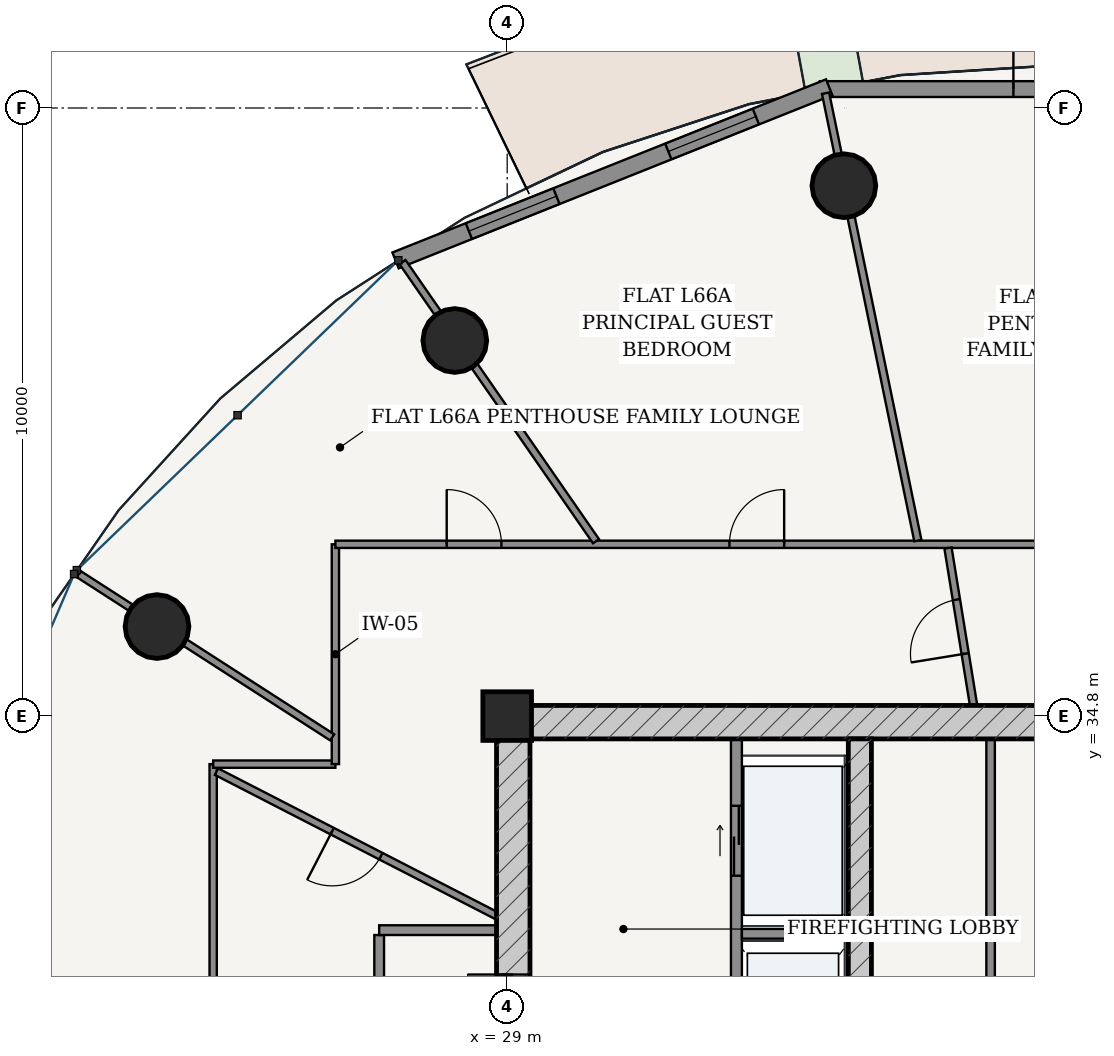
"""IFC4 building model, lengths in metres.
Left out: names, types, materials, properties, quantities, classifications, styles, units other than length and angle.
Written with IfcOpenShell. Run it as: python <this file> out.ifc"""

import sys

from ifc_helpers import new_model, si_unit, direction, frame, frame_2d, origin, origin_2d, place, context, subcontext, project, spatial, rectangle, hollow_circle, extrude, source, transform, mapped, element, fill, save


model = new_model("IFC4")
c1 = context("Model", 3, precision=1e-05, world=origin(), true_north=direction((-0.2419218956, 0.970295726276)))
c2 = subcontext(c1, "Body", "Model", "MODEL_VIEW")
j1 = project(units=[si_unit("LENGTHUNIT", "METRE"), si_unit("PLANEANGLEUNIT", "RADIAN")], contexts=[c1])
p1 = place(None, origin())
s1 = spatial("IfcSite", under=j1, at=p1, CompositionType="ELEMENT")
p2 = place(p1, origin())
s2 = spatial("IfcBuilding", under=s1, at=p2, CompositionType="ELEMENT")
p3 = place(p2, frame((0.0, 0.0, 251.95)))
s3 = spatial("IfcBuildingStorey", under=s2, at=p3, CompositionType="ELEMENT", Elevation=251.95)
p4 = place(p3, frame((29.0, 34.8, 0.0), z_axis=(0.0, 0.0, 1.0), x_axis=(1.0, 0.0, 0.0)))
e1 = element("IfcColumn", 1, at=p4, inside=s3, PredefinedType="COLUMN", context=c2, shape_type="SweptSolid", body=[
    extrude(rectangle(XDim=0.8, YDim=0.8, at=origin_2d()), origin(), (0.0, 0.0, 1.0), 3.75),
])
p5 = place(p3, frame((28.825, 34.7, 0.0), z_axis=(0.0, 0.0, 1.0), x_axis=(1.0, 0.0, 0.0)))
e2 = element("IfcWall", 2, at=p5, inside=s3, PredefinedType="SHEAR", context=c2, shape_type="SweptSolid", body=[
    extrude(rectangle(XDim=18.35, YDim=0.55, at=frame_2d((9.175, 0.0))), origin(), (0.0, 0.0, 1.0), 3.49),
])
p6 = place(p3, frame((29.1, 19.175, 0.0), z_axis=(0.0, 0.0, 1.0), x_axis=(0.0, 1.0, 0.0)))
e3 = element("IfcWall", 3, at=p6, inside=s3, PredefinedType="SHEAR", context=c2, shape_type="SweptSolid", body=[
    extrude(rectangle(XDim=15.25, YDim=0.55, at=frame_2d((7.625, 0.0))), origin(), (0.0, 0.0, 1.0), 3.49),
])
p7 = place(p6, frame((9.875, 0.0, 0.0)))
e4 = element("IfcOpeningElement", 4, at=p7, cuts=e3, PredefinedType="OPENING", context=c2, shape_type="SweptSolid", body=[
    extrude(rectangle(XDim=1.5, YDim=2.2, at=frame_2d((0.75, 1.1))), frame((0.0, 0.285, 0.0), z_axis=(0.0, -1.0, 0.0), x_axis=(1.0, 0.0, 0.0)), (0.0, 0.0, 1.0), 0.57),
])
p8 = place(p3, frame((34.8, 19.175, 0.0), z_axis=(0.0, 0.0, 1.0), x_axis=(0.0, 1.0, 0.0)))
e5 = element("IfcWall", 5, at=p8, inside=s3, PredefinedType="SHEAR", context=c2, shape_type="SweptSolid", body=[
    extrude(rectangle(XDim=15.25, YDim=0.38, at=frame_2d((7.625, 0.0))), origin(), (0.0, 0.0, 1.0), 3.49),
])
p9 = place(p8, frame((7.8, 0.0, 0.0)))
e6 = element("IfcOpeningElement", 6, at=p9, cuts=e5, PredefinedType="OPENING", context=c2, shape_type="SweptSolid", body=[
    extrude(rectangle(XDim=1.05, YDim=2.15, at=frame_2d((0.525, 1.075))), frame((0.0, 0.2, 0.0), z_axis=(0.0, -1.0, 0.0), x_axis=(1.0, 0.0, 0.0)), (0.0, 0.0, 1.0), 0.4),
])
for number, where, z_axis, x_axis in (
    (7, (34.537, 43.522, 0.0), (0.0, 0.0, 1.0), (1.0, 0.0, 0.0)),
    (8, (28.139, 40.977, 0.0), (0.0, 0.0, 1.0), (1.0, 0.0, 0.0)),
    (9, (23.241, 36.272, 0.0), (0.0, 0.0, 1.0), (1.0, 0.0, 0.0)),
):
    element("IfcColumn", number, at=place(p3, frame(where, z_axis=z_axis, x_axis=x_axis)), inside=s3, PredefinedType="COLUMN", context=c2, shape_type="SweptSolid", body=[
        extrude(hollow_circle(Radius=0.525, WallThickness=0.035, at=origin_2d()), origin(), (0.0, 0.0, 1.0), 3.75),
    ])
p10 = place(p3, frame((41.859, 45.111, 0.0), z_axis=(0.0, 0.0, 1.0), x_axis=(-1.0, 0.0, 0.0)))
e10 = element("IfcWall", 10, at=p10, inside=s3, PredefinedType="SOLIDWALL", context=c2, shape_type="SweptSolid", body=[
    extrude(rectangle(XDim=7.718, YDim=0.26, at=frame_2d((3.859, 0.0))), origin(), (0.0, 0.0, 1.0), 3.49),
])
p11 = place(p10, frame((3.184, 0.0, 0.0)))
e11 = element("IfcOpeningElement", 11, at=p11, cuts=e10, PredefinedType="OPENING", context=c2, shape_type="SweptSolid", body=[
    extrude(rectangle(XDim=1.35, YDim=2.2, at=frame_2d((0.675, 1.1))), frame((0.0, 0.14, 0.0), z_axis=(0.0, -1.0, 0.0), x_axis=(1.0, 0.0, 0.0)), (0.0, 0.0, 1.0), 0.28),
])
p12 = place(p3, frame((34.295, 45.141, 0.0), z_axis=(0.0, 0.0, 1.0), x_axis=(-0.928724272392, -0.370771123296, 0.0)))
e12 = element("IfcWall", 12, at=p12, inside=s3, PredefinedType="SOLIDWALL", context=c2, shape_type="SweptSolid", body=[
    extrude(rectangle(XDim=7.678, YDim=0.28, at=frame_2d((3.839, 0.0))), origin(), (0.0, 0.0, 1.0), 3.49),
])
p13 = place(p12, frame((1.298, 0.0, 0.85)))
e13 = element("IfcOpeningElement", 13, at=p13, cuts=e12, PredefinedType="OPENING", context=c2, shape_type="SweptSolid", body=[
    extrude(rectangle(XDim=1.55, YDim=1.95, at=frame_2d((0.775, 0.975))), frame((0.0, 0.15, 0.0), z_axis=(0.0, -1.0, 0.0), x_axis=(1.0, 0.0, 0.0)), (0.0, 0.0, 1.0), 0.3),
])
p14 = place(p12, frame((4.83, 0.0, 0.85)))
e14 = element("IfcOpeningElement", 14, at=p14, cuts=e12, PredefinedType="OPENING", context=c2, shape_type="SweptSolid", body=[
    extrude(rectangle(XDim=1.55, YDim=1.95, at=frame_2d((0.775, 0.975))), frame((0.0, 0.15, 0.0), z_axis=(0.0, -1.0, 0.0), x_axis=(1.0, 0.0, 0.0)), (0.0, 0.0, 1.0), 0.3),
])
p15 = place(p3, frame((32.77, 28.52, 0.0), z_axis=(0.0, 0.0, 1.0), x_axis=(0.0, 1.0, 0.0)))
e15 = element("IfcWall", 15, at=p15, inside=s3, PredefinedType="PARTITIONING", context=c2, shape_type="SweptSolid", body=[
    extrude(rectangle(XDim=5.905, YDim=0.18, at=frame_2d((2.953, 0.0))), origin(), (0.0, 0.0, 1.0), 3.49),
])
p16 = place(p15, frame((3.655, 0.0, 0.0)))
e16 = element("IfcOpeningElement", 16, at=p16, cuts=e15, PredefinedType="OPENING", context=c2, shape_type="SweptSolid", body=[
    extrude(rectangle(XDim=1.15, YDim=2.2, at=frame_2d((0.575, 1.1))), frame((0.0, 0.1, 0.0), z_axis=(0.0, -1.0, 0.0), x_axis=(1.0, 0.0, 0.0)), (0.0, 0.0, 1.0), 0.2),
])
p17 = place(p15, frame((0.73, 0.0, 0.0)))
e17 = element("IfcOpeningElement", 17, at=p17, cuts=e15, PredefinedType="OPENING", context=c2, shape_type="SweptSolid", body=[
    extrude(rectangle(XDim=1.2, YDim=2.25, at=frame_2d((0.6, 1.125))), frame((0.0, 0.1, 0.0), z_axis=(0.0, -1.0, 0.0), x_axis=(1.0, 0.0, 0.0)), (0.0, 0.0, 1.0), 0.2),
])
p18 = place(p3, frame((32.86, 31.22, 0.0), z_axis=(0.0, 0.0, 1.0), x_axis=(1.0, 0.0, 0.0)))
e18 = element("IfcWall", 18, at=p18, inside=s3, PredefinedType="PARTITIONING", context=c2, shape_type="SweptSolid", body=[
    extrude(rectangle(XDim=1.75, YDim=0.16, at=frame_2d((0.875, 0.0))), origin(), (0.0, 0.0, 1.0), 3.49),
])
p19 = place(p3, frame((36.95, 28.56, 0.0), z_axis=(0.0, 0.0, 1.0), x_axis=(0.0, 1.0, 0.0)))
e19 = element("IfcWall", 19, at=p19, inside=s3, PredefinedType="PARTITIONING", context=c2, shape_type="SweptSolid", body=[
    extrude(rectangle(XDim=5.865, YDim=0.14, at=frame_2d((2.933, 0.0))), origin(), (0.0, 0.0, 1.0), 3.49),
])
p20 = place(p3, frame((26.895, 17.275, 0.0), z_axis=(0.0, 0.0, 1.0), x_axis=(0.0, 1.0, 0.0)))
e20 = element("IfcWall", 20, at=p20, inside=s3, PredefinedType="PARTITIONING", context=c2, shape_type="SweptSolid", body=[
    extrude(rectangle(XDim=13.925, YDim=0.16, at=frame_2d((6.962, 0.0))), origin(), (0.0, 0.0, 1.0), 3.015),
])
p21 = place(p3, frame((26.895, 31.28, 0.0), z_axis=(0.0, 0.0, 1.0), x_axis=(1.0, 0.0, 0.0)))
e21 = element("IfcWall", 21, at=p21, inside=s3, PredefinedType="PARTITIONING", context=c2, shape_type="SweptSolid", body=[
    extrude(rectangle(XDim=1.93, YDim=0.16, at=frame_2d((0.965, 0.0))), origin(), (0.0, 0.0, 1.0), 3.49),
])
p22 = place(p3, frame((24.165, 24.249, 0.0), z_axis=(0.0, 0.0, 1.0), x_axis=(0.0, 1.0, 0.0)))
e22 = element("IfcWall", 22, at=p22, inside=s3, PredefinedType="PARTITIONING", context=c2, shape_type="SweptSolid", body=[
    extrude(rectangle(XDim=9.761, YDim=0.12, at=frame_2d((4.88, 0.0))), origin(), (0.0, 0.0, 1.0), 3.015),
])
p23 = place(p22, frame((4.43, 0.0, 0.0)))
e23 = element("IfcOpeningElement", 23, at=p23, cuts=e22, PredefinedType="OPENING", context=c2, shape_type="SweptSolid", body=[
    extrude(rectangle(XDim=0.9, YDim=2.15, at=frame_2d((0.45, 1.075))), frame((0.0, 0.07, 0.0), z_axis=(0.0, -1.0, 0.0), x_axis=(1.0, 0.0, 0.0)), (0.0, 0.0, 1.0), 0.14),
])
p24 = place(p3, frame((24.165, 34.01, 0.0), z_axis=(0.0, 0.0, 1.0), x_axis=(1.0, 0.0, 0.0)))
e24 = element("IfcWall", 24, at=p24, inside=s3, PredefinedType="PARTITIONING", context=c2, shape_type="SweptSolid", body=[
    extrude(rectangle(XDim=2.01, YDim=0.12, at=frame_2d((1.005, 0.0))), origin(), (0.0, 0.0, 1.0), 3.209),
])
p25 = place(p3, frame((26.175, 34.01, 0.0), z_axis=(0.0, 0.0, 1.0), x_axis=(0.0, 1.0, 0.0)))
e25 = element("IfcWall", 25, at=p25, inside=s3, PredefinedType="PARTITIONING", context=c2, shape_type="SweptSolid", body=[
    extrude(rectangle(XDim=3.615, YDim=0.12, at=frame_2d((1.808, 0.0))), origin(), (0.0, 0.0, 1.0), 3.015),
])
p26 = place(p3, frame((26.175, 37.625, 0.0), z_axis=(0.0, 0.0, 1.0), x_axis=(1.0, 0.0, 0.0)))
e26 = element("IfcWall", 26, at=p26, inside=s3, PredefinedType="PARTITIONING", context=c2, shape_type="SweptSolid", body=[
    extrude(rectangle(XDim=23.65, YDim=0.12, at=frame_2d((11.825, 0.0))), origin(), (0.0, 0.0, 1.0), 3.015),
])
p27 = place(p26, frame((12.791, 0.0, 0.0)))
e27 = element("IfcOpeningElement", 27, at=p27, cuts=e26, PredefinedType="OPENING", context=c2, shape_type="SweptSolid", body=[
    extrude(rectangle(XDim=0.9, YDim=2.15, at=frame_2d((0.45, 1.075))), frame((0.0, 0.07, 0.0), z_axis=(0.0, -1.0, 0.0), x_axis=(1.0, 0.0, 0.0)), (0.0, 0.0, 1.0), 0.14),
])
p28 = place(p26, frame((6.48, 0.0, 0.0)))
e28 = element("IfcOpeningElement", 28, at=p28, cuts=e26, PredefinedType="OPENING", context=c2, shape_type="SweptSolid", body=[
    extrude(rectangle(XDim=0.9, YDim=2.15, at=frame_2d((0.45, 1.075))), frame((0.0, 0.07, 0.0), z_axis=(0.0, -1.0, 0.0), x_axis=(1.0, 0.0, 0.0)), (0.0, 0.0, 1.0), 0.14),
])
p29 = place(p26, frame((1.831, 0.0, 0.0)))
e29 = element("IfcOpeningElement", 29, at=p29, cuts=e26, PredefinedType="OPENING", context=c2, shape_type="SweptSolid", body=[
    extrude(rectangle(XDim=0.9, YDim=2.15, at=frame_2d((0.45, 1.075))), frame((0.0, 0.07, 0.0), z_axis=(0.0, -1.0, 0.0), x_axis=(1.0, 0.0, 0.0)), (0.0, 0.0, 1.0), 0.14),
])
p30 = place(p3, frame((35.754, 37.686, 0.0), z_axis=(0.0, 0.0, 1.0), x_axis=(-0.202105877204, 0.979363678313, 0.0)))
e30 = element("IfcWall", 30, at=p30, inside=s3, PredefinedType="PARTITIONING", context=c2, shape_type="SweptSolid", body=[
    extrude(rectangle(XDim=7.512, YDim=0.12, at=frame_2d((3.756, 0.0))), origin(), (0.0, 0.0, 1.0), 3.015),
])
p31 = place(p3, frame((30.461, 37.676, 0.0), z_axis=(0.0, 0.0, 1.0), x_axis=(-0.569689482466, 0.821860020665, 0.0)))
e31 = element("IfcWall", 31, at=p31, inside=s3, PredefinedType="PARTITIONING", context=c2, shape_type="SweptSolid", body=[
    extrude(rectangle(XDim=5.585, YDim=0.12, at=frame_2d((2.792, 0.0))), origin(), (0.0, 0.0, 1.0), 3.015),
])
p32 = place(p3, frame((26.123, 34.45, 0.0), z_axis=(0.0, 0.0, 1.0), x_axis=(-0.840703033126, 0.541496454367, 0.0)))
e32 = element("IfcWall", 32, at=p32, inside=s3, PredefinedType="PARTITIONING", context=c2, shape_type="SweptSolid", body=[
    extrude(rectangle(XDim=4.958, YDim=0.12, at=frame_2d((2.479, 0.0))), origin(), (0.0, 0.0, 1.0), 3.015),
])
p33 = place(p3, frame((36.67, 34.977, 0.0), z_axis=(0.0, 0.0, 1.0), x_axis=(-0.160605953374, 0.98701860557, 0.0)))
e33 = element("IfcWall", 33, at=p33, inside=s3, PredefinedType="PARTITIONING", context=c2, shape_type="SweptSolid", body=[
    extrude(rectangle(XDim=2.621, YDim=0.12, at=frame_2d((1.31, 0.0))), origin(), (0.0, 0.0, 1.0), 2.575),
])
p34 = place(p33, frame((0.86, 0.0, 0.0)))
e34 = element("IfcOpeningElement", 34, at=p34, cuts=e33, PredefinedType="OPENING", context=c2, shape_type="SweptSolid", body=[
    extrude(rectangle(XDim=0.9, YDim=2.15, at=frame_2d((0.45, 1.075))), frame((0.0, 0.07, 0.0), z_axis=(0.0, -1.0, 0.0), x_axis=(1.0, 0.0, 0.0)), (0.0, 0.0, 1.0), 0.14),
])
p35 = place(p3, frame((28.825, 31.518, 0.0), z_axis=(0.0, 0.0, 1.0), x_axis=(-0.889305882583, 0.457312854842, 0.0)))
e35 = element("IfcWall", 35, at=p35, inside=s3, PredefinedType="PARTITIONING", context=c2, shape_type="SweptSolid", body=[
    extrude(rectangle(XDim=5.178, YDim=0.12, at=frame_2d((2.589, 0.0))), origin(), (0.0, 0.0, 1.0), 3.209),
])
p36 = place(p35, frame((2.139, 0.0, 0.0)))
e36 = element("IfcOpeningElement", 36, at=p36, cuts=e35, PredefinedType="OPENING", context=c2, shape_type="SweptSolid", body=[
    extrude(rectangle(XDim=0.9, YDim=2.15, at=frame_2d((0.45, 1.075))), frame((0.0, 0.07, 0.0), z_axis=(0.0, -1.0, 0.0), x_axis=(1.0, 0.0, 0.0)), (0.0, 0.0, 1.0), 0.14),
])
m1 = source(origin(), c2, "Body", "SweptSolid", [
    extrude(rectangle(XDim=1.35, YDim=2.2, at=frame_2d((0.675, 1.1))), frame((0.0, 0.025, 0.0), z_axis=(0.0, -1.0, 0.0), x_axis=(1.0, 0.0, 0.0)), (0.0, 0.0, 1.0), 0.05),
])
p37 = place(p11, frame((1.35, 0.0, 0.0), z_axis=(0.0, 0.0, 1.0), x_axis=(-1.0, 0.0, 0.0)))
e37 = element("IfcDoor", 37, at=p37, inside=s3, OperationType="SINGLE_SWING_LEFT", PredefinedType="DOOR", context=c2, shape_type="MappedRepresentation", body=[
    mapped(m1, transform((0.0, 0.0, 0.0), scale=1.0)),
])
fill(e11, e37)
m2 = source(origin(), c2, "Body", "SweptSolid", [
    extrude(rectangle(XDim=1.55, YDim=1.95, at=frame_2d((0.775, 0.975))), frame((0.0, 0.03, 0.0), z_axis=(0.0, -1.0, 0.0), x_axis=(1.0, 0.0, 0.0)), (0.0, 0.0, 1.0), 0.06),
])
p38 = place(p13, origin())
e38 = element("IfcWindow", 38, at=p38, inside=s3, PartitioningType="SINGLE_PANEL", PredefinedType="WINDOW", context=c2, shape_type="MappedRepresentation", body=[
    mapped(m2, transform((0.0, 0.0, 0.0), scale=1.0)),
])
fill(e13, e38)
p39 = place(p14, origin())
e39 = element("IfcWindow", 39, at=p39, inside=s3, PartitioningType="SINGLE_PANEL", PredefinedType="WINDOW", context=c2, shape_type="MappedRepresentation", body=[
    mapped(m2, transform((0.0, 0.0, 0.0), scale=1.0)),
])
fill(e14, e39)
m3 = source(origin(), c2, "Body", "SweptSolid", [
    extrude(rectangle(XDim=1.5, YDim=2.2, at=frame_2d((0.75, 1.1))), frame((0.0, 0.025, 0.0), z_axis=(0.0, -1.0, 0.0), x_axis=(1.0, 0.0, 0.0)), (0.0, 0.0, 1.0), 0.05),
])
p40 = place(p7, origin())
e40 = element("IfcDoor", 40, at=p40, inside=s3, OperationType="DOUBLE_DOOR_SINGLE_SWING", PredefinedType="DOOR", context=c2, shape_type="MappedRepresentation", body=[
    mapped(m3, transform((0.0, 0.0, 0.0), scale=1.0)),
])
fill(e4, e40)
m4 = source(origin(), c2, "Body", "SweptSolid", [
    extrude(rectangle(XDim=1.15, YDim=2.2, at=frame_2d((0.575, 1.1))), frame((0.0, 0.025, 0.0), z_axis=(0.0, -1.0, 0.0), x_axis=(1.0, 0.0, 0.0)), (0.0, 0.0, 1.0), 0.05),
])
p41 = place(p16, origin())
e41 = element("IfcDoor", 41, at=p41, inside=s3, OperationType="DOUBLE_DOOR_SLIDING", PredefinedType="DOOR", context=c2, shape_type="MappedRepresentation", body=[
    mapped(m4, transform((0.0, 0.0, 0.0), scale=1.0)),
])
fill(e16, e41)
m5 = source(origin(), c2, "Body", "SweptSolid", [
    extrude(rectangle(XDim=0.9, YDim=2.15, at=frame_2d((0.45, 1.075))), frame((0.0, 0.025, 0.0), z_axis=(0.0, -1.0, 0.0), x_axis=(1.0, 0.0, 0.0)), (0.0, 0.0, 1.0), 0.05),
])
p42 = place(p34, origin())
e42 = element("IfcDoor", 42, at=p42, inside=s3, OperationType="SINGLE_SWING_LEFT", PredefinedType="DOOR", context=c2, shape_type="MappedRepresentation", body=[
    mapped(m5, transform((0.0, 0.0, 0.0), scale=1.0)),
])
fill(e34, e42)
p43 = place(p36, origin())
e43 = element("IfcDoor", 43, at=p43, inside=s3, OperationType="SINGLE_SWING_RIGHT", PredefinedType="DOOR", context=c2, shape_type="MappedRepresentation", body=[
    mapped(m5, transform((0.0, 0.0, 0.0), scale=1.0)),
])
fill(e36, e43)
p44 = place(p28, origin())
e44 = element("IfcDoor", 44, at=p44, inside=s3, OperationType="SINGLE_SWING_RIGHT", PredefinedType="DOOR", context=c2, shape_type="MappedRepresentation", body=[
    mapped(m5, transform((0.0, 0.0, 0.0), scale=1.0)),
])
fill(e28, e44)
p45 = place(p29, origin())
e45 = element("IfcDoor", 45, at=p45, inside=s3, OperationType="SINGLE_SWING_LEFT", PredefinedType="DOOR", context=c2, shape_type="MappedRepresentation", body=[
    mapped(m5, transform((0.0, 0.0, 0.0), scale=1.0)),
])
fill(e29, e45)
save(model, sys.argv[1])
